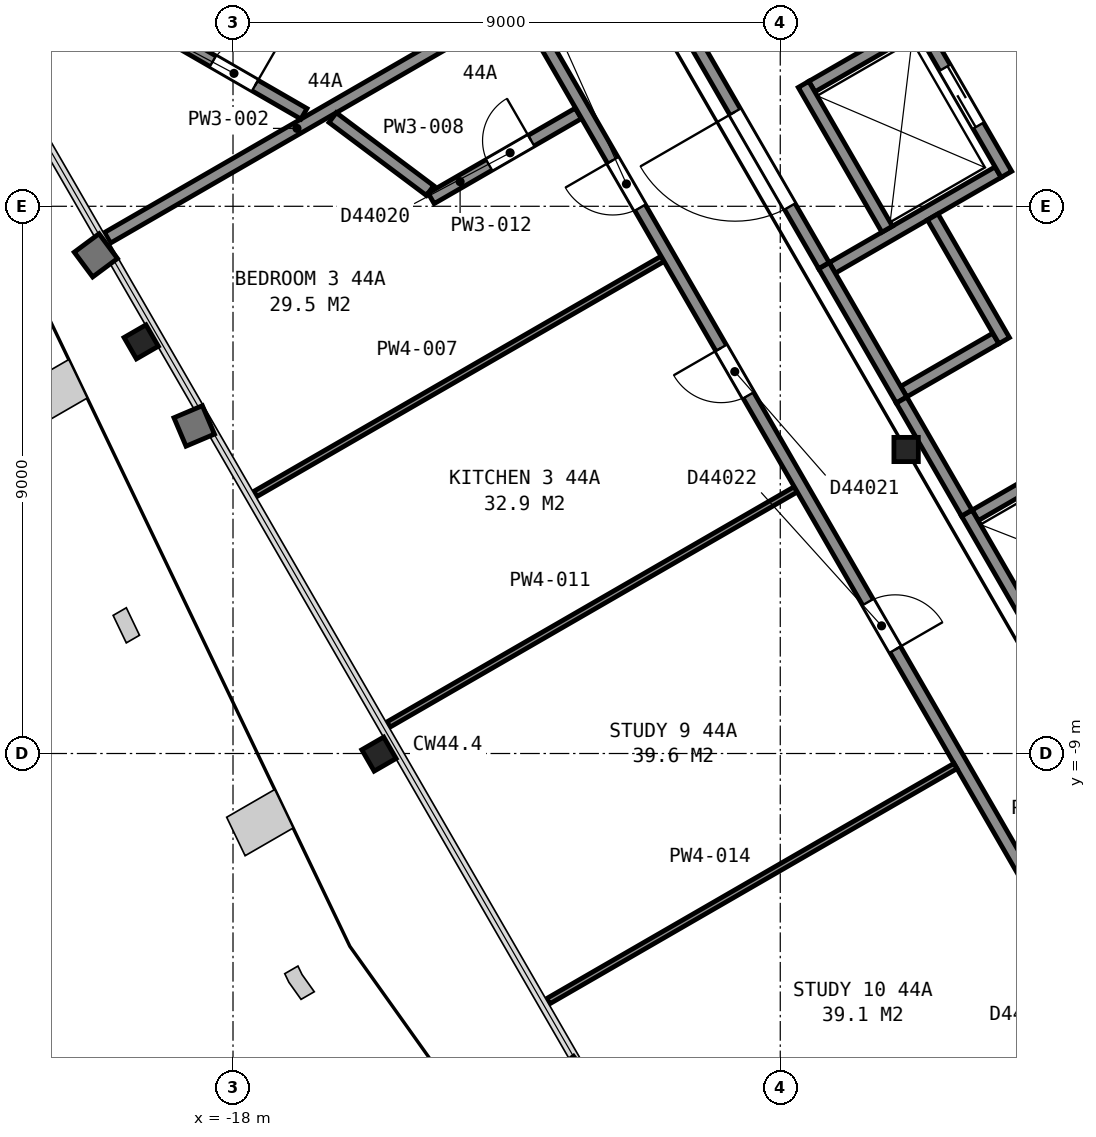
"""IFC4 building model, lengths in metres.
Left out: names, types, materials, properties, quantities, classifications, styles, units other than length and angle.
Written with IfcOpenShell. Run it as: python <this file> out.ifc"""

import sys

from ifc_helpers import new_model, si_unit, direction, frame, frame_2d, origin, origin_2d, place, context, subcontext, project, spatial, rectangle, i_section, extrude, element, fill, save


model = new_model("IFC4")
c1 = context("Model", 3, precision=1e-05, world=origin(), true_north=direction((0.0, 1.0)))
c2 = subcontext(c1, "Body", "Model", "MODEL_VIEW")
j1 = project(units=[si_unit("LENGTHUNIT", "METRE"), si_unit("PLANEANGLEUNIT", "RADIAN")], contexts=[c1])
p1 = place(None, origin())
s1 = spatial("IfcSite", under=j1, at=p1, CompositionType="ELEMENT")
p2 = place(p1, origin())
s2 = spatial("IfcBuilding", under=s1, at=p2, CompositionType="ELEMENT")
p3 = place(p2, frame((0.0, 0.0, 178.4)))
s3 = spatial("IfcBuildingStorey", under=s2, at=p3, CompositionType="ELEMENT", Elevation=178.4)
for number, where, z_axis, x_axis in (
    (1, (-19.51, -2.23, 0.035), (0.0, 0.0, 1.0), (-0.5, 0.866, 0.0)),
    (2, (-15.6, -9.01, 0.035), (0.0, 0.0, 1.0), (-0.5, 0.866, 0.0)),
):
    element("IfcColumn", number, at=place(p3, frame(where, z_axis=z_axis, x_axis=x_axis)), inside=s3, PredefinedType="COLUMN", context=c2, shape_type="SweptSolid", body=[
        extrude(i_section(OverallWidth=0.406, OverallDepth=0.417, WebThickness=0.03, FlangeThickness=0.048, FilletRadius=0.015, at=origin_2d()), origin(), (0.0, 0.0, 1.0), 3.665),
    ])
p4 = place(p3, frame((-6.93, -4.0, 0.0), z_axis=(0.0, 0.0, 1.0), x_axis=(1.0, 0.0, 0.0)))
e3 = element("IfcColumn", 3, at=p4, inside=s3, PredefinedType="COLUMN", context=c2, shape_type="SweptSolid", body=[
    extrude(i_section(OverallWidth=0.401, OverallDepth=0.399, WebThickness=0.025, FlangeThickness=0.04, FilletRadius=0.015, at=origin_2d()), origin(), (0.0, 0.0, 1.0), 3.7),
])
for number, where, z_axis, x_axis in (
    (4, (-5.795, -5.083, 0.0), (0.0, 0.0, 1.0), (0.866, 0.5, 0.0)),
    (5, (-6.97, -3.048, 0.0), (0.0, 0.0, 1.0), (0.866, 0.5, 0.0)),
):
    element("IfcWall", number, at=place(p3, frame(where, z_axis=z_axis, x_axis=x_axis)), inside=s3, PredefinedType="PARTITIONING", context=c2, shape_type="SweptSolid", body=[
        extrude(rectangle(XDim=1.75, YDim=0.2, at=frame_2d((0.875, 0.0))), origin(), (0.0, 0.0, 1.0), 3.7),
    ])
p5 = place(p3, frame((-8.145, -1.013, 0.0), z_axis=(0.0, 0.0, 1.0), x_axis=(0.866016494683, 0.500015430699, 0.0)))
e6 = element("IfcWall", 6, at=p5, inside=s3, PredefinedType="PARTITIONING", context=c2, shape_type="SweptSolid", body=[
    extrude(rectangle(XDim=3.15, YDim=0.2, at=frame_2d((1.575, 0.0))), origin(), (0.0, 0.0, 1.0), 3.7),
])
p6 = place(p3, frame((-8.48, 1.969, 0.0), z_axis=(0.0, 0.0, 1.0), x_axis=(0.866000020948, 0.500043961785, 0.0)))
e7 = element("IfcWall", 7, at=p6, inside=s3, PredefinedType="PARTITIONING", context=c2, shape_type="SweptSolid", body=[
    extrude(rectangle(XDim=1.95, YDim=0.2, at=frame_2d((0.975, 0.0))), origin(), (0.0, 0.0, 1.0), 3.7),
])
p7 = place(p3, frame((-5.28, 0.525, 0.0), z_axis=(0.0, 0.0, 1.0), x_axis=(-0.500037662692, 0.866003658127, 0.0)))
e8 = element("IfcWall", 8, at=p7, inside=s3, PredefinedType="PARTITIONING", context=c2, shape_type="SweptSolid", body=[
    extrude(rectangle(XDim=2.95, YDim=0.2, at=frame_2d((1.475, 0.0))), origin(), (0.0, 0.0, 1.0), 3.7),
])
p8 = place(p7, frame((0.925, 0.0, 0.0)))
e9 = element("IfcOpeningElement", 9, at=p8, cuts=e8, PredefinedType="OPENING", context=c2, shape_type="SweptSolid", body=[
    extrude(rectangle(XDim=1.1, YDim=2.1, at=frame_2d((0.55, 1.05))), frame((0.0, 0.11, 0.0), z_axis=(0.0, -1.0, 0.0), x_axis=(1.0, 0.0, 0.0)), (0.0, 0.0, 1.0), 0.22),
])
p9 = place(p3, frame((-5.318, -2.21, 0.0), z_axis=(0.0, 0.0, 1.0), x_axis=(-0.499938297808, 0.866061024631, 0.0)))
e10 = element("IfcWall", 10, at=p9, inside=s3, PredefinedType="PARTITIONING", context=c2, shape_type="SweptSolid", body=[
    extrude(rectangle(XDim=2.35, YDim=0.2, at=frame_2d((1.175, 0.0))), origin(), (0.0, 0.0, 1.0), 3.7),
])
p10 = place(p3, frame((-7.242, -0.376, 0.0), z_axis=(0.0, 0.0, 1.0), x_axis=(-0.499996545922, 0.866027397988, 0.0)))
e11 = element("IfcWall", 11, at=p10, inside=s3, PredefinedType="PARTITIONING", context=c2, shape_type="SweptSolid", body=[
    extrude(rectangle(XDim=2.75, YDim=0.2, at=frame_2d((1.375, 0.0))), origin(), (0.0, 0.0, 1.0), 3.7),
])
for number, where, z_axis, x_axis in (
    (12, (-4.656, -7.255, 0.0), (0.0, 0.0, 1.0), (-0.5, 0.866, 0.0)),
    (13, (-7.006, -3.185, 0.0), (0.0, 0.0, 1.0), (-0.5, 0.866, 0.0)),
):
    element("IfcWall", number, at=place(p3, frame(where, z_axis=z_axis, x_axis=x_axis)), inside=s3, PredefinedType="PARTITIONING", context=c2, shape_type="SweptSolid", body=[
        extrude(rectangle(XDim=2.55, YDim=0.2, at=frame_2d((1.275, 0.0))), origin(), (0.0, 0.0, 1.0), 3.7),
    ])
p11 = place(p3, frame((-11.591, 4.755, 0.0), z_axis=(0.0, 0.0, 1.0), x_axis=(0.500043977787, -0.866000011708, 0.0)))
e14 = element("IfcWall", 14, at=p11, inside=s3, PredefinedType="PARTITIONING", context=c2, shape_type="SweptSolid", body=[
    extrude(rectangle(XDim=6.617, YDim=0.2, at=frame_2d((3.308, 0.0))), origin(), (0.0, 0.0, 1.0), 3.45),
])
p12 = place(p11, frame((3.695, 0.0, 0.0)))
e15 = element("IfcOpeningElement", 15, at=p12, cuts=e14, PredefinedType="OPENING", context=c2, shape_type="SweptSolid", body=[
    extrude(rectangle(XDim=1.8, YDim=2.1, at=frame_2d((0.9, 1.05))), frame((0.0, 0.11, 0.0), z_axis=(0.0, -1.0, 0.0), x_axis=(1.0, 0.0, 0.0)), (0.0, 0.0, 1.0), 0.22),
])
p13 = place(p3, frame((-7.005, -3.187, 0.0), z_axis=(0.0, 0.0, 1.0), x_axis=(0.499689606989, -0.866204535123, 0.0)))
e16 = element("IfcWall", 16, at=p13, inside=s3, PredefinedType="PARTITIONING", context=c2, shape_type="SweptSolid", body=[
    extrude(rectangle(XDim=2.145, YDim=0.2, at=frame_2d((1.072, 0.0))), origin(), (0.0, 0.0, 1.0), 3.45),
])
p14 = place(p3, frame((-20.064, -0.518, 0.0), z_axis=(0.0, 0.0, 1.0), x_axis=(0.865994046034, 0.500054309285, 0.0)))
e17 = element("IfcWall", 17, at=p14, inside=s3, PredefinedType="PARTITIONING", context=c2, shape_type="SweptSolid", body=[
    extrude(rectangle(XDim=7.196, YDim=0.2, at=frame_2d((3.598, 0.0))), origin(), (0.0, 0.0, 1.0), 2.713),
])
p15 = place(p3, frame((-19.136, 2.851, 0.0), z_axis=(0.0, 0.0, 1.0), x_axis=(0.866008217664, -0.500029766052, 0.0)))
e18 = element("IfcWall", 18, at=p15, inside=s3, PredefinedType="PARTITIONING", context=c2, shape_type="SweptSolid", body=[
    extrude(rectangle(XDim=2.659, YDim=0.2, at=frame_2d((1.33, 0.0))), origin(), (0.0, 0.0, 1.0), 2.713),
])
p16 = place(p15, frame((0.93, 0.0, 0.0)))
e19 = element("IfcOpeningElement", 19, at=p16, cuts=e18, PredefinedType="OPENING", context=c2, shape_type="SweptSolid", body=[
    extrude(rectangle(XDim=0.8, YDim=2.1, at=frame_2d((0.4, 1.05))), frame((0.0, 0.11, 0.0), z_axis=(0.0, -1.0, 0.0), x_axis=(1.0, 0.0, 0.0)), (0.0, 0.0, 1.0), 0.22),
])
p17 = place(p3, frame((-17.632, -4.731, 0.0), z_axis=(0.0, 0.0, 1.0), x_axis=(0.866002098189, 0.500040364304, 0.0)))
e20 = element("IfcWall", 20, at=p17, inside=s3, PredefinedType="PARTITIONING", context=c2, shape_type="SweptSolid", body=[
    extrude(rectangle(XDim=7.733, YDim=0.1, at=frame_2d((3.867, 0.0))), origin(), (0.0, 0.0, 1.0), 2.713),
])
p18 = place(p3, frame((-16.362, 1.459, 0.0), z_axis=(0.0, 0.0, 1.0), x_axis=(0.800219351666, -0.59970741968, 0.0)))
e21 = element("IfcWall", 21, at=p18, inside=s3, PredefinedType="PARTITIONING", context=c2, shape_type="SweptSolid", body=[
    extrude(rectangle(XDim=2.003, YDim=0.2, at=frame_2d((1.001, 0.0))), origin(), (0.0, 0.0, 1.0), 2.713),
])
p19 = place(p3, frame((-15.442, -8.523, 0.0), z_axis=(0.0, 0.0, 1.0), x_axis=(0.866007875589, 0.500030358497, 0.0)))
e22 = element("IfcWall", 22, at=p19, inside=s3, PredefinedType="PARTITIONING", context=c2, shape_type="SweptSolid", body=[
    extrude(rectangle(XDim=7.733, YDim=0.1, at=frame_2d((3.866, 0.0))), origin(), (0.0, 0.0, 1.0), 2.713),
])
p20 = place(p3, frame((-14.742, 0.13, 0.0), z_axis=(0.0, 0.0, 1.0), x_axis=(0.866003766563, 0.500037474894, 0.0)))
e23 = element("IfcWall", 23, at=p20, inside=s3, PredefinedType="PARTITIONING", context=c2, shape_type="SweptSolid", body=[
    extrude(rectangle(XDim=2.795, YDim=0.2, at=frame_2d((1.397, 0.0))), origin(), (0.0, 0.0, 1.0), 2.713),
])
p21 = place(p20, frame((1.1, 0.0, 0.0)))
e24 = element("IfcOpeningElement", 24, at=p21, cuts=e23, PredefinedType="OPENING", context=c2, shape_type="SweptSolid", body=[
    extrude(rectangle(XDim=0.8, YDim=2.1, at=frame_2d((0.4, 1.05))), frame((0.0, 0.11, 0.0), z_axis=(0.0, -1.0, 0.0), x_axis=(1.0, 0.0, 0.0)), (0.0, 0.0, 1.0), 0.22),
])
p22 = place(p3, frame((-4.075, -12.545, 0.0), z_axis=(0.0, 0.0, 1.0), x_axis=(-0.499997769292, 0.86602669168, 0.0)))
e25 = element("IfcWall", 25, at=p22, inside=s3, PredefinedType="PARTITIONING", context=c2, shape_type="SweptSolid", body=[
    extrude(rectangle(XDim=17.706, YDim=0.2, at=frame_2d((8.853, 0.0))), origin(), (0.0, 0.0, 1.0), 2.713),
])
p23 = place(p22, frame((14.46, 0.0, 0.0)))
e26 = element("IfcOpeningElement", 26, at=p23, cuts=e25, PredefinedType="OPENING", context=c2, shape_type="SweptSolid", body=[
    extrude(rectangle(XDim=0.9, YDim=2.1, at=frame_2d((0.45, 1.05))), frame((0.0, 0.11, 0.0), z_axis=(0.0, -1.0, 0.0), x_axis=(1.0, 0.0, 0.0)), (0.0, 0.0, 1.0), 0.22),
])
p24 = place(p22, frame((10.896, 0.0, 0.0)))
e27 = element("IfcOpeningElement", 27, at=p24, cuts=e25, PredefinedType="OPENING", context=c2, shape_type="SweptSolid", body=[
    extrude(rectangle(XDim=0.9, YDim=2.1, at=frame_2d((0.45, 1.05))), frame((0.0, 0.11, 0.0), z_axis=(0.0, -1.0, 0.0), x_axis=(1.0, 0.0, 0.0)), (0.0, 0.0, 1.0), 0.22),
])
p25 = place(p22, frame((6.068, 0.0, 0.0)))
e28 = element("IfcOpeningElement", 28, at=p25, cuts=e25, PredefinedType="OPENING", context=c2, shape_type="SweptSolid", body=[
    extrude(rectangle(XDim=0.9, YDim=2.1, at=frame_2d((0.45, 1.05))), frame((0.0, 0.11, 0.0), z_axis=(0.0, -1.0, 0.0), x_axis=(1.0, 0.0, 0.0)), (0.0, 0.0, 1.0), 0.22),
])
p26 = place(p3, frame((-12.815, -13.073, 0.0), z_axis=(0.0, 0.0, 1.0), x_axis=(0.866007875589, 0.500030358497, 0.0)))
e29 = element("IfcWall", 29, at=p26, inside=s3, PredefinedType="PARTITIONING", context=c2, shape_type="SweptSolid", body=[
    extrude(rectangle(XDim=7.733, YDim=0.1, at=frame_2d((3.866, 0.0))), origin(), (0.0, 0.0, 1.0), 2.713),
])
p27 = place(p8, origin())
e30 = element("IfcDoor", 30, at=p27, inside=s3, OperationType="SLIDING_TO_LEFT", PredefinedType="DOOR", context=c2, shape_type="SweptSolid", body=[
    extrude(rectangle(XDim=1.1, YDim=2.1, at=frame_2d((0.55, 1.05))), frame((0.0, 0.025, 0.0), z_axis=(0.0, -1.0, 0.0), x_axis=(1.0, 0.0, 0.0)), (0.0, 0.0, 1.0), 0.05),
])
fill(e9, e30)
p28 = place(p12, origin())
e31 = element("IfcDoor", 31, at=p28, inside=s3, OperationType="DOUBLE_DOOR_SINGLE_SWING", PredefinedType="DOOR", context=c2, shape_type="SweptSolid", body=[
    extrude(rectangle(XDim=1.8, YDim=2.1, at=frame_2d((0.9, 1.05))), frame((0.0, 0.025, 0.0), z_axis=(0.0, -1.0, 0.0), x_axis=(1.0, 0.0, 0.0)), (0.0, 0.0, 1.0), 0.05),
])
fill(e15, e31)
p29 = place(p16, origin())
e32 = element("IfcDoor", 32, at=p29, inside=s3, OperationType="SINGLE_SWING_RIGHT", PredefinedType="DOOR", context=c2, shape_type="SweptSolid", body=[
    extrude(rectangle(XDim=0.8, YDim=2.1, at=frame_2d((0.4, 1.05))), frame((0.0, 0.025, 0.0), z_axis=(0.0, -1.0, 0.0), x_axis=(1.0, 0.0, 0.0)), (0.0, 0.0, 1.0), 0.05),
])
fill(e19, e32)
p30 = place(p21, origin())
e33 = element("IfcDoor", 33, at=p30, inside=s3, OperationType="SINGLE_SWING_RIGHT", PredefinedType="DOOR", context=c2, shape_type="SweptSolid", body=[
    extrude(rectangle(XDim=0.8, YDim=2.1, at=frame_2d((0.4, 1.05))), frame((0.0, 0.025, 0.0), z_axis=(0.0, -1.0, 0.0), x_axis=(1.0, 0.0, 0.0)), (0.0, 0.0, 1.0), 0.05),
])
fill(e24, e33)
p31 = place(p23, origin())
e34 = element("IfcDoor", 34, at=p31, inside=s3, OperationType="SINGLE_SWING_RIGHT", PredefinedType="DOOR", context=c2, shape_type="SweptSolid", body=[
    extrude(rectangle(XDim=0.9, YDim=2.1, at=frame_2d((0.45, 1.05))), frame((0.0, 0.025, 0.0), z_axis=(0.0, -1.0, 0.0), x_axis=(1.0, 0.0, 0.0)), (0.0, 0.0, 1.0), 0.05),
])
fill(e26, e34)
p32 = place(p24, origin())
e35 = element("IfcDoor", 35, at=p32, inside=s3, OperationType="SINGLE_SWING_RIGHT", PredefinedType="DOOR", context=c2, shape_type="SweptSolid", body=[
    extrude(rectangle(XDim=0.9, YDim=2.1, at=frame_2d((0.45, 1.05))), frame((0.0, 0.025, 0.0), z_axis=(0.0, -1.0, 0.0), x_axis=(1.0, 0.0, 0.0)), (0.0, 0.0, 1.0), 0.05),
])
fill(e27, e35)
p33 = place(p25, origin())
e36 = element("IfcDoor", 36, at=p33, inside=s3, OperationType="SINGLE_SWING_LEFT", PredefinedType="DOOR", context=c2, shape_type="SweptSolid", body=[
    extrude(rectangle(XDim=0.9, YDim=2.1, at=frame_2d((0.45, 1.05))), frame((0.0, 0.025, 0.0), z_axis=(0.0, -1.0, 0.0), x_axis=(1.0, 0.0, 0.0)), (0.0, 0.0, 1.0), 0.05),
])
fill(e28, e36)
save(model, sys.argv[1])
